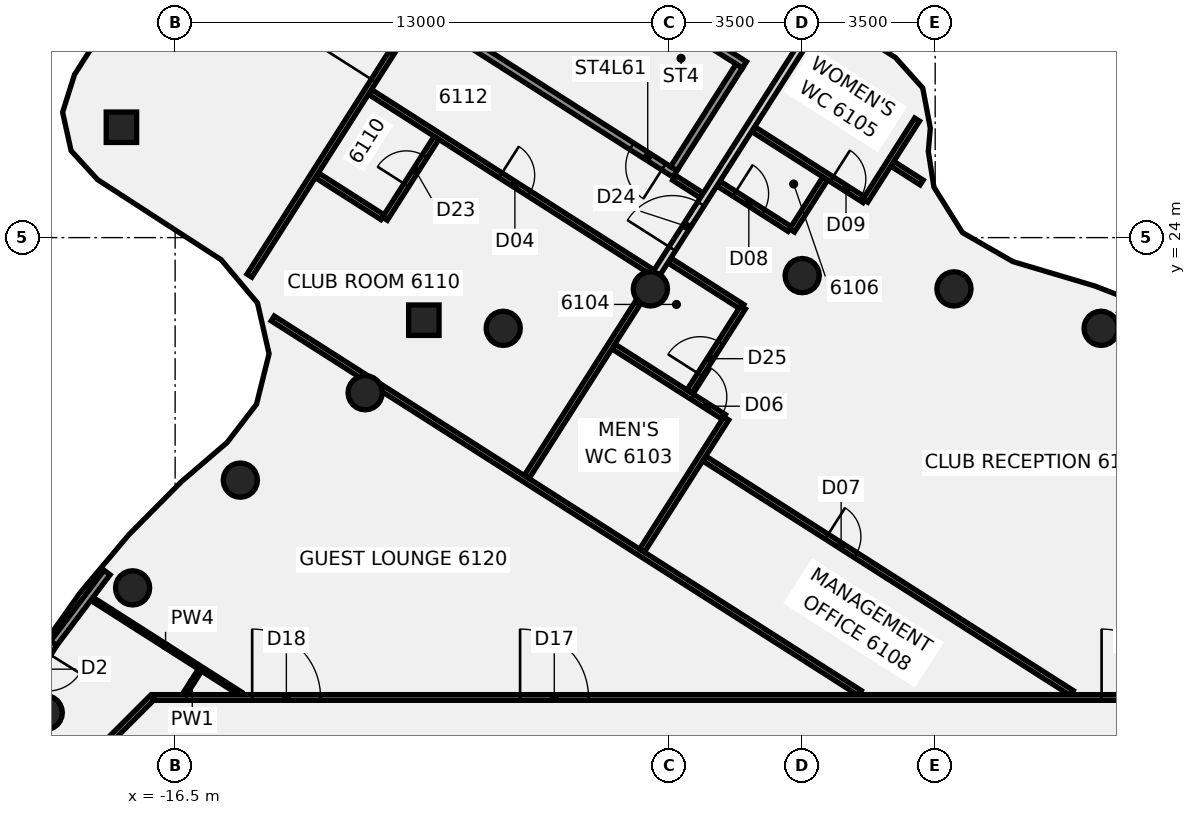
"""IFC4 building model, lengths in metres.
Left out: names, types, materials, properties, quantities, classifications, styles, units other than length and angle.
Written with IfcOpenShell. Run it as: python <this file> out.ifc"""

import sys

from ifc_helpers import new_model, si_unit, direction, frame, frame_2d, origin, origin_2d, place, context, subcontext, project, spatial, rectangle, circle, extrude, element, fill, save


model = new_model("IFC4")
c1 = context("Model", 3, precision=1e-05, world=origin(), true_north=direction((0.0, 1.0)))
c2 = subcontext(c1, "Body", "Model", "MODEL_VIEW")
j1 = project(units=[si_unit("LENGTHUNIT", "METRE"), si_unit("PLANEANGLEUNIT", "RADIAN")], contexts=[c1])
p1 = place(None, origin())
s1 = spatial("IfcSite", under=j1, at=p1, CompositionType="ELEMENT")
p2 = place(p1, origin())
s2 = spatial("IfcBuilding", under=s1, at=p2, CompositionType="ELEMENT")
p3 = place(p2, frame((0.0, 0.0, 241.5)))
s3 = spatial("IfcBuildingStorey", under=s2, at=p3, CompositionType="ELEMENT", Elevation=241.5)
for number, where, z_axis, x_axis in (
    (1, (7.866, 21.613, -0.14), (0.0, 0.0, 1.0), (1.0, 0.0, 0.0)),
    (2, (3.994, 22.651, -0.14), (0.0, 0.0, 1.0), (1.0, 0.0, 0.0)),
    (3, (0.0, 23.0, -0.14), (0.0, 0.0, 1.0), (1.0, 0.0, 0.0)),
    (4, (-3.994, 22.651, -0.14), (0.0, 0.0, 1.0), (1.0, 0.0, 0.0)),
    (5, (-7.866, 21.613, -0.14), (0.0, 0.0, 1.0), (1.0, 0.0, 0.0)),
    (6, (-11.5, 19.919, -0.14), (0.0, 0.0, 1.0), (1.0, 0.0, 0.0)),
    (7, (-14.784, 17.619, -0.14), (0.0, 0.0, 1.0), (1.0, 0.0, 0.0)),
    (8, (-17.619, 14.784, -0.14), (0.0, 0.0, 1.0), (1.0, 0.0, 0.0)),
    (9, (-19.919, 11.5, -0.14), (0.0, 0.0, 1.0), (1.0, 0.0, 0.0)),
):
    element("IfcColumn", number, at=place(p3, frame(where, z_axis=z_axis, x_axis=x_axis)), inside=s3, PredefinedType="COLUMN", context=c2, shape_type="SweptSolid", body=[
        extrude(circle(Radius=0.45, at=origin_2d()), origin(), (0.0, 0.0, 1.0), 3.6),
    ])
p4 = place(p3, frame((-9.955, 21.827, -0.139), z_axis=(0.001287809675, -0.050360136255, 0.998730293033), x_axis=(0.538621535495, 0.841513383158, 0.041738081745)))
e10 = element("IfcColumn", 10, at=p4, inside=s3, PredefinedType="COLUMN", context=c2, shape_type="SweptSolid", body=[
    extrude(rectangle(XDim=0.8, YDim=0.8, at=origin_2d()), origin(), (0.0, 0.0, 1.0), 3.602),
])
p5 = place(p3, frame((-17.913, 26.904, -0.138), z_axis=(0.059587509842, -0.140916408411, 0.988226641268), x_axis=(0.540447417782, 0.836893731057, 0.086749475673)))
e11 = element("IfcColumn", 11, at=p5, inside=s3, PredefinedType="COLUMN", context=c2, shape_type="SweptSolid", body=[
    extrude(rectangle(XDim=0.8, YDim=0.8, at=origin_2d()), origin(), (0.0, 0.0, 1.0), 3.638),
])
p6 = place(p3, frame((-18.724, 14.517, 0.0), z_axis=(0.0, 0.0, 1.0), x_axis=(0.843037970222, -0.537854051546, 0.0)))
e12 = element("IfcWall", 12, at=p6, inside=s3, PredefinedType="PARTITIONING", context=c2, shape_type="SweptSolid", body=[
    extrude(rectangle(XDim=4.68, YDim=0.1, at=frame_2d((2.34, 0.0))), origin(), (0.0, 0.0, 1.0), 2.864),
])
p7 = place(p3, frame((-13.932, 21.873, 0.0), z_axis=(0.0, 0.0, 1.0), x_axis=(0.84305579935, -0.537826104966, 0.0)))
e13 = element("IfcWall", 13, at=p7, inside=s3, PredefinedType="PARTITIONING", context=c2, shape_type="SweptSolid", body=[
    extrude(rectangle(XDim=2.874, YDim=0.15, at=frame_2d((1.437, 0.0))), origin(), (0.0, 0.0, 1.0), 2.864),
])
p8 = place(p3, frame((-11.129, 20.085, 0.0), z_axis=(0.0, 0.0, 1.0), x_axis=(0.843050351753, -0.537834644114, 0.0)))
e14 = element("IfcWall", 14, at=p8, inside=s3, PredefinedType="PARTITIONING", context=c2, shape_type="SweptSolid", body=[
    extrude(rectangle(XDim=14.999, YDim=0.15, at=frame_2d((7.5, 0.0))), origin(), (0.0, 0.0, 1.0), 2.864),
])
p9 = place(p3, frame((-12.768, 25.638, 0.0), z_axis=(0.0, 0.0, 1.0), x_axis=(0.842938331802, -0.538010193935, 0.0)))
e15 = element("IfcWall", 15, at=p9, inside=s3, PredefinedType="PARTITIONING", context=c2, shape_type="SweptSolid", body=[
    extrude(rectangle(XDim=2.046, YDim=0.15, at=frame_2d((1.023, 0.0))), origin(), (0.0, 0.0, 1.0), 2.864),
])
p10 = place(p3, frame((-11.369, 27.83, 0.0), z_axis=(0.0, 0.0, 1.0), x_axis=(0.842808712654, -0.53821322343, 0.0)))
e16 = element("IfcWall", 16, at=p10, inside=s3, PredefinedType="PARTITIONING", context=c2, shape_type="SweptSolid", body=[
    extrude(rectangle(XDim=8.781, YDim=0.15, at=frame_2d((4.391, 0.0))), origin(), (0.0, 0.0, 1.0), 2.864),
])
p11 = place(p10, frame((4.07, 0.0, 0.0)))
e17 = element("IfcOpeningElement", 17, at=p11, cuts=e16, PredefinedType="OPENING", context=c2, shape_type="SweptSolid", body=[
    extrude(rectangle(XDim=0.9, YDim=2.1, at=frame_2d((0.45, 1.05))), frame((0.0, 0.085, 0.0), z_axis=(0.0, -1.0, 0.0), x_axis=(1.0, 0.0, 0.0)), (0.0, 0.0, 1.0), 0.17),
])
p12 = place(p3, frame((-3.367, 25.571, 0.0), z_axis=(0.0, 0.0, 1.0), x_axis=(0.843064660237, -0.537812215052, 0.0)))
e18 = element("IfcWall", 18, at=p12, inside=s3, PredefinedType="PARTITIONING", context=c2, shape_type="SweptSolid", body=[
    extrude(rectangle(XDim=0.86, YDim=0.15, at=frame_2d((0.43, 0.0))), origin(), (0.0, 0.0, 1.0), 2.864),
])
p13 = place(p3, frame((-4.965, 21.134, 0.0), z_axis=(0.0, 0.0, 1.0), x_axis=(0.843056900244, -0.537824379283, 0.0)))
e19 = element("IfcWall", 19, at=p13, inside=s3, PredefinedType="PARTITIONING", context=c2, shape_type="SweptSolid", body=[
    extrude(rectangle(XDim=3.445, YDim=0.15, at=frame_2d((1.723, 0.0))), origin(), (0.0, 0.0, 1.0), 2.864),
])
p14 = place(p13, frame((2.469, 0.0, 0.0)))
e20 = element("IfcOpeningElement", 20, at=p14, cuts=e19, PredefinedType="OPENING", context=c2, shape_type="SweptSolid", body=[
    extrude(rectangle(XDim=0.9, YDim=2.1, at=frame_2d((0.45, 1.05))), frame((0.0, 0.085, 0.0), z_axis=(0.0, -1.0, 0.0), x_axis=(1.0, 0.0, 0.0)), (0.0, 0.0, 1.0), 0.17),
])
p15 = place(p3, frame((-3.491, 23.397, 0.0), z_axis=(0.0, 0.0, 1.0), x_axis=(0.84298020295, -0.53794458584, 0.0)))
e21 = element("IfcWall", 21, at=p15, inside=s3, PredefinedType="PARTITIONING", context=c2, shape_type="SweptSolid", body=[
    extrude(rectangle(XDim=2.275, YDim=0.15, at=frame_2d((1.137, 0.0))), origin(), (0.0, 0.0, 1.0), 2.864),
])
p16 = place(p3, frame((-2.575, 18.186, 0.0), z_axis=(0.0, 0.0, 1.0), x_axis=(0.843059611205, -0.537820129741, 0.0)))
e22 = element("IfcWall", 22, at=p16, inside=s3, PredefinedType="PARTITIONING", context=c2, shape_type="SweptSolid", body=[
    extrude(rectangle(XDim=11.468, YDim=0.15, at=frame_2d((5.734, 0.0))), origin(), (0.0, 0.0, 1.0), 2.864),
])
p17 = place(p16, frame((3.82, 0.0, 0.0)))
e23 = element("IfcOpeningElement", 23, at=p17, cuts=e22, PredefinedType="OPENING", context=c2, shape_type="SweptSolid", body=[
    extrude(rectangle(XDim=0.9, YDim=2.1, at=frame_2d((0.45, 1.05))), frame((0.0, 0.085, 0.0), z_axis=(0.0, -1.0, 0.0), x_axis=(1.0, 0.0, 0.0)), (0.0, 0.0, 1.0), 0.17),
])
p18 = place(p3, frame((-2.2, 25.42, 0.0), z_axis=(0.0, 0.0, 1.0), x_axis=(0.842975391094, -0.537952126133, 0.0)))
e24 = element("IfcWall", 24, at=p18, inside=s3, PredefinedType="PARTITIONING", context=c2, shape_type="SweptSolid", body=[
    extrude(rectangle(XDim=2.215, YDim=0.15, at=frame_2d((1.107, 0.0))), origin(), (0.0, 0.0, 1.0), 2.864),
])
p19 = place(p18, frame((0.495, 0.0, 0.0)))
e25 = element("IfcOpeningElement", 25, at=p19, cuts=e24, PredefinedType="OPENING", context=c2, shape_type="SweptSolid", body=[
    extrude(rectangle(XDim=0.9, YDim=2.1, at=frame_2d((0.45, 1.05))), frame((0.0, 0.085, 0.0), z_axis=(0.0, -1.0, 0.0), x_axis=(1.0, 0.0, 0.0)), (0.0, 0.0, 1.0), 0.17),
])
p20 = place(p3, frame((-1.287, 26.854, 0.0), z_axis=(0.0, 0.0, 1.0), x_axis=(0.842983894233, -0.537938801412, 0.0)))
e26 = element("IfcWall", 26, at=p20, inside=s3, PredefinedType="PARTITIONING", context=c2, shape_type="SweptSolid", body=[
    extrude(rectangle(XDim=3.475, YDim=0.15, at=frame_2d((1.738, 0.0))), origin(), (0.0, 0.0, 1.0), 2.864),
])
p21 = place(p20, frame((2.445, 0.0, 0.0)))
e27 = element("IfcOpeningElement", 27, at=p21, cuts=e26, PredefinedType="OPENING", context=c2, shape_type="SweptSolid", body=[
    extrude(rectangle(XDim=0.9, YDim=2.1, at=frame_2d((0.45, 1.05))), frame((0.0, 0.085, 0.0), z_axis=(0.0, -1.0, 0.0), x_axis=(1.0, 0.0, 0.0)), (0.0, 0.0, 1.0), 0.17),
])
p22 = place(p3, frame((2.372, 25.943, 0.0), z_axis=(0.0, 0.0, 1.0), x_axis=(0.842803803876, -0.538220910197, 0.0)))
e28 = element("IfcWall", 28, at=p22, inside=s3, PredefinedType="PARTITIONING", context=c2, shape_type="SweptSolid", body=[
    extrude(rectangle(XDim=0.915, YDim=0.15, at=frame_2d((0.458, 0.0))), origin(), (0.0, 0.0, 1.0), 2.864),
])
p23 = place(p3, frame((-17.065, 11.9, 0.0), z_axis=(0.0, 0.0, 1.0), x_axis=(1.0, 0.0, 0.0)))
e29 = element("IfcWall", 29, at=p23, inside=s3, PredefinedType="PARTITIONING", context=c2, shape_type="SweptSolid", body=[
    extrude(rectangle(XDim=34.165, YDim=0.15, at=frame_2d((17.083, 0.0))), origin(), (0.0, 0.0, 1.0), 2.864),
])
p24 = place(p23, frame((24.944, 0.0, 0.0)))
e30 = element("IfcOpeningElement", 30, at=p24, cuts=e29, PredefinedType="OPENING", context=c2, shape_type="SweptSolid", body=[
    extrude(rectangle(XDim=1.8, YDim=2.1, at=frame_2d((0.9, 1.05))), frame((0.0, 0.085, 0.0), z_axis=(0.0, -1.0, 0.0), x_axis=(1.0, 0.0, 0.0)), (0.0, 0.0, 1.0), 0.17),
])
p25 = place(p23, frame((9.642, 0.0, 0.0)))
e31 = element("IfcOpeningElement", 31, at=p25, cuts=e29, PredefinedType="OPENING", context=c2, shape_type="SweptSolid", body=[
    extrude(rectangle(XDim=1.8, YDim=2.1, at=frame_2d((0.9, 1.05))), frame((0.0, 0.085, 0.0), z_axis=(0.0, -1.0, 0.0), x_axis=(1.0, 0.0, 0.0)), (0.0, 0.0, 1.0), 0.17),
])
p26 = place(p23, frame((2.592, 0.0, 0.0)))
e32 = element("IfcOpeningElement", 32, at=p26, cuts=e29, PredefinedType="OPENING", context=c2, shape_type="SweptSolid", body=[
    extrude(rectangle(XDim=1.8, YDim=2.1, at=frame_2d((0.9, 1.05))), frame((0.0, 0.085, 0.0), z_axis=(0.0, -1.0, 0.0), x_axis=(1.0, 0.0, 0.0)), (0.0, 0.0, 1.0), 0.17),
])
p27 = place(p3, frame((-18.872, 10.128, 0.0), z_axis=(0.0, 0.0, 1.0), x_axis=(0.707106781187, 0.707106781187, 0.0)))
e33 = element("IfcWall", 33, at=p27, inside=s3, PredefinedType="PARTITIONING", context=c2, shape_type="SweptSolid", body=[
    extrude(rectangle(XDim=2.505, YDim=0.15, at=frame_2d((1.253, 0.0))), origin(), (0.0, 0.0, 1.0), 2.864),
])
p28 = place(p3, frame((-16.252, 11.984, 0.0), z_axis=(0.0, 0.0, 1.0), x_axis=(0.537879071862, 0.843022006861, 0.0)))
e34 = element("IfcWall", 34, at=p28, inside=s3, PredefinedType="PARTITIONING", context=c2, shape_type="SweptSolid", body=[
    extrude(rectangle(XDim=0.755, YDim=0.1, at=frame_2d((0.378, 0.0))), origin(), (0.0, 0.0, 1.0), 2.864),
])
p29 = place(p3, frame((-14.545, 23.0, 0.0), z_axis=(0.0, 0.0, 1.0), x_axis=(0.537610956174, 0.84319301456, 0.0)))
e35 = element("IfcWall", 35, at=p29, inside=s3, PredefinedType="PARTITIONING", context=c2, shape_type="SweptSolid", body=[
    extrude(rectangle(XDim=13.679, YDim=0.15, at=frame_2d((6.839, 0.0))), origin(), (0.0, 0.0, 1.0), 2.864),
])
p30 = place(p29, frame((6.08, 0.0, 0.0)))
e36 = element("IfcOpeningElement", 36, at=p30, cuts=e35, PredefinedType="OPENING", context=c2, shape_type="SweptSolid", body=[
    extrude(rectangle(XDim=1.8, YDim=2.1, at=frame_2d((0.9, 1.05))), frame((0.0, 0.085, 0.0), z_axis=(0.0, -1.0, 0.0), x_axis=(1.0, 0.0, 0.0)), (0.0, 0.0, 1.0), 0.17),
])
p31 = place(p3, frame((-10.98, 24.497, 0.0), z_axis=(0.0, 0.0, 1.0), x_axis=(0.537727831527, 0.843118484675, 0.0)))
e37 = element("IfcWall", 37, at=p31, inside=s3, PredefinedType="PARTITIONING", context=c2, shape_type="SweptSolid", body=[
    extrude(rectangle(XDim=2.52, YDim=0.15, at=frame_2d((1.26, 0.0))), origin(), (0.0, 0.0, 1.0), 2.864),
])
p32 = place(p31, frame((1.05, 0.0, 0.0)))
e38 = element("IfcOpeningElement", 38, at=p32, cuts=e37, PredefinedType="OPENING", context=c2, shape_type="SweptSolid", body=[
    extrude(rectangle(XDim=0.9, YDim=2.1, at=frame_2d((0.45, 1.05))), frame((0.0, 0.085, 0.0), z_axis=(0.0, -1.0, 0.0), x_axis=(1.0, 0.0, 0.0)), (0.0, 0.0, 1.0), 0.17),
])
p33 = place(p3, frame((-7.248, 17.704, 0.0), z_axis=(0.0, 0.0, 1.0), x_axis=(0.537934380023, 0.842986715666, 0.0)))
e39 = element("IfcWall", 39, at=p33, inside=s3, PredefinedType="PARTITIONING", context=c2, shape_type="SweptSolid", body=[
    extrude(rectangle(XDim=5.697, YDim=0.15, at=frame_2d((2.848, 0.0))), origin(), (0.0, 0.0, 1.0), 2.864),
])
p34 = place(p3, frame((-3.941, 22.886, 0.0), z_axis=(0.0, 0.0, 1.0), x_axis=(0.537927996359, 0.842990789234, 0.0)))
e40 = element("IfcWall", 40, at=p34, inside=s3, PredefinedType="PARTITIONING", context=c2, shape_type="SweptSolid", body=[
    extrude(rectangle(XDim=8.072, YDim=0.2, at=frame_2d((4.036, 0.0))), origin(), (0.0, 0.0, 1.0), 2.864),
])
p35 = place(p34, frame((0.973, 0.0, 0.0)))
e41 = element("IfcOpeningElement", 41, at=p35, cuts=e40, PredefinedType="OPENING", context=c2, shape_type="SweptSolid", body=[
    extrude(rectangle(XDim=1.4, YDim=2.1, at=frame_2d((0.7, 1.05))), frame((0.0, 0.11, 0.0), z_axis=(0.0, -1.0, 0.0), x_axis=(1.0, 0.0, 0.0)), (0.0, 0.0, 1.0), 0.22),
])
p36 = place(p3, frame((-4.213, 15.767, 0.0), z_axis=(0.0, 0.0, 1.0), x_axis=(0.53797543427, 0.842960516348, 0.0)))
e42 = element("IfcWall", 42, at=p36, inside=s3, PredefinedType="PARTITIONING", context=c2, shape_type="SweptSolid", body=[
    extrude(rectangle(XDim=4.12, YDim=0.15, at=frame_2d((2.06, 0.0))), origin(), (0.0, 0.0, 1.0), 2.864),
])
p37 = place(p3, frame((1.662, 24.973, 0.0), z_axis=(0.0, 0.0, 1.0), x_axis=(0.537980026961, 0.842957585286, 0.0)))
e43 = element("IfcWall", 43, at=p37, inside=s3, PredefinedType="PARTITIONING", context=c2, shape_type="SweptSolid", body=[
    extrude(rectangle(XDim=2.531, YDim=0.15, at=frame_2d((1.265, 0.0))), origin(), (0.0, 0.0, 1.0), 2.864),
])
p38 = place(p3, frame((-2.966, 19.954, 0.0), z_axis=(0.0, 0.0, 1.0), x_axis=(0.53785794484, 0.843035486307, 0.0)))
e44 = element("IfcWall", 44, at=p38, inside=s3, PredefinedType="PARTITIONING", context=c2, shape_type="SweptSolid", body=[
    extrude(rectangle(XDim=2.62, YDim=0.15, at=frame_2d((1.31, 0.0))), origin(), (0.0, 0.0, 1.0), 2.864),
])
p39 = place(p38, frame((0.52, 0.0, 0.0)))
e45 = element("IfcOpeningElement", 45, at=p39, cuts=e44, PredefinedType="OPENING", context=c2, shape_type="SweptSolid", body=[
    extrude(rectangle(XDim=1.0, YDim=2.1, at=frame_2d((0.5, 1.05))), frame((0.0, 0.085, 0.0), z_axis=(0.0, -1.0, 0.0), x_axis=(1.0, 0.0, 0.0)), (0.0, 0.0, 1.0), 0.17),
])
p40 = place(p3, frame((-0.266, 24.186, 0.0), z_axis=(0.0, 0.0, 1.0), x_axis=(0.537889588497, 0.843015296769, 0.0)))
e46 = element("IfcWall", 46, at=p40, inside=s3, PredefinedType="PARTITIONING", context=c2, shape_type="SweptSolid", body=[
    extrude(rectangle(XDim=1.619, YDim=0.15, at=frame_2d((0.81, 0.0))), origin(), (0.0, 0.0, 1.0), 2.864),
])
p41 = place(p3, frame((-18.292, 15.189, 0.0), z_axis=(0.0, 0.0, 1.0), x_axis=(-0.601920736141, -0.798555838626, 0.0)))
e47 = element("IfcWall", 47, at=p41, inside=s3, PredefinedType="SOLIDWALL", context=c2, shape_type="SweptSolid", body=[
    extrude(rectangle(XDim=2.337, YDim=0.2, at=frame_2d((1.168, 0.0))), origin(), (0.0, 0.0, 1.0), 3.46),
])
p42 = place(p3, frame((-19.698, 13.323, 0.0), z_axis=(0.0, 0.0, 1.0), x_axis=(-0.529504774597, -0.848306957226, 0.0)))
e48 = element("IfcWall", 48, at=p42, inside=s3, PredefinedType="SOLIDWALL", context=c2, shape_type="SweptSolid", body=[
    extrude(rectangle(XDim=1.599, YDim=0.2, at=frame_2d((0.8, 0.0))), origin(), (0.0, 0.0, 1.0), 3.46),
])
p43 = place(p42, frame((0.299, 0.0, 0.0)))
e49 = element("IfcOpeningElement", 49, at=p43, cuts=e48, PredefinedType="OPENING", context=c2, shape_type="SweptSolid", body=[
    extrude(rectangle(XDim=1.0, YDim=2.4, at=frame_2d((0.5, 1.2))), frame((0.0, 0.11, 0.0), z_axis=(0.0, -1.0, 0.0), x_axis=(1.0, 0.0, 0.0)), (0.0, 0.0, 1.0), 0.22),
])
p44 = place(p3, frame((-3.347, 25.677, -0.14), z_axis=(0.0, 0.0, 1.0), x_axis=(-0.843048766939, 0.537837128286, 0.0)))
e50 = element("IfcWall", 50, at=p44, inside=s3, PredefinedType="SHEAR", context=c2, shape_type="SweptSolid", body=[
    extrude(rectangle(XDim=6.7, YDim=0.2, at=frame_2d((3.35, 0.0))), origin(), (0.0, 0.0, 1.0), 3.004),
])
p45 = place(p44, frame((0.35, 0.0, 0.0)))
e51 = element("IfcOpeningElement", 51, at=p45, cuts=e50, PredefinedType="OPENING", context=c2, shape_type="SweptSolid", body=[
    extrude(rectangle(XDim=1.0, YDim=2.1, at=frame_2d((0.5, 1.05))), frame((0.0, 0.11, 0.0), z_axis=(0.0, -1.0, 0.0), x_axis=(1.0, 0.0, 0.0)), (0.0, 0.0, 1.0), 0.22),
])
p46 = place(p3, frame((-1.519, 28.544, -0.14), z_axis=(0.0, 0.0, 1.0), x_axis=(-0.843048766939, 0.537837128286, 0.0)))
e52 = element("IfcWall", 52, at=p46, inside=s3, PredefinedType="SHEAR", context=c2, shape_type="SweptSolid", body=[
    extrude(rectangle(XDim=6.7, YDim=0.2, at=frame_2d((3.35, 0.0))), origin(), (0.0, 0.0, 1.0), 3.004),
])
p47 = place(p3, frame((-1.657, 28.513, -0.14), z_axis=(0.0, 0.0, 1.0), x_axis=(-0.537808215086, -0.843067211903, 0.0)))
e53 = element("IfcWall", 53, at=p47, inside=s3, PredefinedType="SHEAR", context=c2, shape_type="SweptSolid", body=[
    extrude(rectangle(XDim=3.2, YDim=0.2, at=frame_2d((1.6, 0.0))), origin(), (0.0, 0.0, 1.0), 3.6),
])
p48 = place(p11, frame((0.9, 0.0, 0.0), z_axis=(0.0, 0.0, 1.0), x_axis=(-1.0, 0.0, 0.0)))
e54 = element("IfcDoor", 54, at=p48, inside=s3, OperationType="SINGLE_SWING_RIGHT", PredefinedType="DOOR", context=c2, shape_type="SweptSolid", body=[
    extrude(rectangle(XDim=0.9, YDim=2.1, at=frame_2d((0.45, 1.05))), frame((0.0, 0.025, 0.0), z_axis=(0.0, -1.0, 0.0), x_axis=(1.0, 0.0, 0.0)), (0.0, 0.0, 1.0), 0.05),
])
fill(e17, e54)
p49 = place(p14, frame((0.9, 0.0, 0.0), z_axis=(0.0, 0.0, 1.0), x_axis=(-1.0, 0.0, 0.0)))
e55 = element("IfcDoor", 55, at=p49, inside=s3, OperationType="SINGLE_SWING_RIGHT", PredefinedType="DOOR", context=c2, shape_type="SweptSolid", body=[
    extrude(rectangle(XDim=0.9, YDim=2.1, at=frame_2d((0.45, 1.05))), frame((0.0, 0.025, 0.0), z_axis=(0.0, -1.0, 0.0), x_axis=(1.0, 0.0, 0.0)), (0.0, 0.0, 1.0), 0.05),
])
fill(e20, e55)
p50 = place(p17, frame((0.9, 0.0, 0.0), z_axis=(0.0, 0.0, 1.0), x_axis=(-1.0, 0.0, 0.0)))
e56 = element("IfcDoor", 56, at=p50, inside=s3, OperationType="SINGLE_SWING_LEFT", PredefinedType="DOOR", context=c2, shape_type="SweptSolid", body=[
    extrude(rectangle(XDim=0.9, YDim=2.1, at=frame_2d((0.45, 1.05))), frame((0.0, 0.025, 0.0), z_axis=(0.0, -1.0, 0.0), x_axis=(1.0, 0.0, 0.0)), (0.0, 0.0, 1.0), 0.05),
])
fill(e23, e56)
p51 = place(p19, origin())
e57 = element("IfcDoor", 57, at=p51, inside=s3, OperationType="SINGLE_SWING_RIGHT", PredefinedType="DOOR", context=c2, shape_type="SweptSolid", body=[
    extrude(rectangle(XDim=0.9, YDim=2.1, at=frame_2d((0.45, 1.05))), frame((0.0, 0.025, 0.0), z_axis=(0.0, -1.0, 0.0), x_axis=(1.0, 0.0, 0.0)), (0.0, 0.0, 1.0), 0.05),
])
fill(e25, e57)
p52 = place(p21, origin())
e58 = element("IfcDoor", 58, at=p52, inside=s3, OperationType="SINGLE_SWING_LEFT", PredefinedType="DOOR", context=c2, shape_type="SweptSolid", body=[
    extrude(rectangle(XDim=0.9, YDim=2.1, at=frame_2d((0.45, 1.05))), frame((0.0, 0.025, 0.0), z_axis=(0.0, -1.0, 0.0), x_axis=(1.0, 0.0, 0.0)), (0.0, 0.0, 1.0), 0.05),
])
fill(e27, e58)
p53 = place(p24, frame((1.8, 0.0, 0.0), z_axis=(0.0, 0.0, 1.0), x_axis=(-1.0, 0.0, 0.0)))
e59 = element("IfcDoor", 59, at=p53, inside=s3, OperationType="DOUBLE_DOOR_SINGLE_SWING", PredefinedType="DOOR", context=c2, shape_type="SweptSolid", body=[
    extrude(rectangle(XDim=1.8, YDim=2.1, at=frame_2d((0.9, 1.05))), frame((0.0, 0.025, 0.0), z_axis=(0.0, -1.0, 0.0), x_axis=(1.0, 0.0, 0.0)), (0.0, 0.0, 1.0), 0.05),
])
fill(e30, e59)
p54 = place(p25, origin())
e60 = element("IfcDoor", 60, at=p54, inside=s3, OperationType="DOUBLE_DOOR_SINGLE_SWING", PredefinedType="DOOR", context=c2, shape_type="SweptSolid", body=[
    extrude(rectangle(XDim=1.8, YDim=2.1, at=frame_2d((0.9, 1.05))), frame((0.0, 0.025, 0.0), z_axis=(0.0, -1.0, 0.0), x_axis=(1.0, 0.0, 0.0)), (0.0, 0.0, 1.0), 0.05),
])
fill(e31, e60)
p55 = place(p26, origin())
e61 = element("IfcDoor", 61, at=p55, inside=s3, OperationType="DOUBLE_DOOR_SINGLE_SWING", PredefinedType="DOOR", context=c2, shape_type="SweptSolid", body=[
    extrude(rectangle(XDim=1.8, YDim=2.1, at=frame_2d((0.9, 1.05))), frame((0.0, 0.025, 0.0), z_axis=(0.0, -1.0, 0.0), x_axis=(1.0, 0.0, 0.0)), (0.0, 0.0, 1.0), 0.05),
])
fill(e32, e61)
p56 = place(p30, origin())
e62 = element("IfcDoor", 62, at=p56, inside=s3, OperationType="DOUBLE_DOOR_SINGLE_SWING", PredefinedType="DOOR", context=c2, shape_type="SweptSolid", body=[
    extrude(rectangle(XDim=1.8, YDim=2.1, at=frame_2d((0.9, 1.05))), frame((0.0, 0.025, 0.0), z_axis=(0.0, -1.0, 0.0), x_axis=(1.0, 0.0, 0.0)), (0.0, 0.0, 1.0), 0.05),
])
fill(e36, e62)
p57 = place(p32, origin())
e63 = element("IfcDoor", 63, at=p57, inside=s3, OperationType="SINGLE_SWING_LEFT", PredefinedType="DOOR", context=c2, shape_type="SweptSolid", body=[
    extrude(rectangle(XDim=0.9, YDim=2.1, at=frame_2d((0.45, 1.05))), frame((0.0, 0.025, 0.0), z_axis=(0.0, -1.0, 0.0), x_axis=(1.0, 0.0, 0.0)), (0.0, 0.0, 1.0), 0.05),
])
fill(e38, e63)
p58 = place(p35, frame((1.4, 0.0, 0.0), z_axis=(0.0, 0.0, 1.0), x_axis=(-1.0, 0.0, 0.0)))
e64 = element("IfcDoor", 64, at=p58, inside=s3, OperationType="DOUBLE_DOOR_SINGLE_SWING", PredefinedType="DOOR", context=c2, shape_type="SweptSolid", body=[
    extrude(rectangle(XDim=1.4, YDim=2.1, at=frame_2d((0.7, 1.05))), frame((0.0, 0.025, 0.0), z_axis=(0.0, -1.0, 0.0), x_axis=(1.0, 0.0, 0.0)), (0.0, 0.0, 1.0), 0.05),
])
fill(e41, e64)
p59 = place(p39, origin())
e65 = element("IfcDoor", 65, at=p59, inside=s3, OperationType="SINGLE_SWING_RIGHT", PredefinedType="DOOR", context=c2, shape_type="SweptSolid", body=[
    extrude(rectangle(XDim=1.0, YDim=2.1, at=frame_2d((0.5, 1.05))), frame((0.0, 0.025, 0.0), z_axis=(0.0, -1.0, 0.0), x_axis=(1.0, 0.0, 0.0)), (0.0, 0.0, 1.0), 0.05),
])
fill(e45, e65)
p60 = place(p45, origin())
e66 = element("IfcDoor", 66, at=p60, inside=s3, OperationType="SINGLE_SWING_LEFT", PredefinedType="DOOR", context=c2, shape_type="SweptSolid", body=[
    extrude(rectangle(XDim=1.0, YDim=2.1, at=frame_2d((0.5, 1.05))), frame((0.0, 0.025, 0.0), z_axis=(0.0, -1.0, 0.0), x_axis=(1.0, 0.0, 0.0)), (0.0, 0.0, 1.0), 0.05),
])
fill(e51, e66)
save(model, sys.argv[1])
